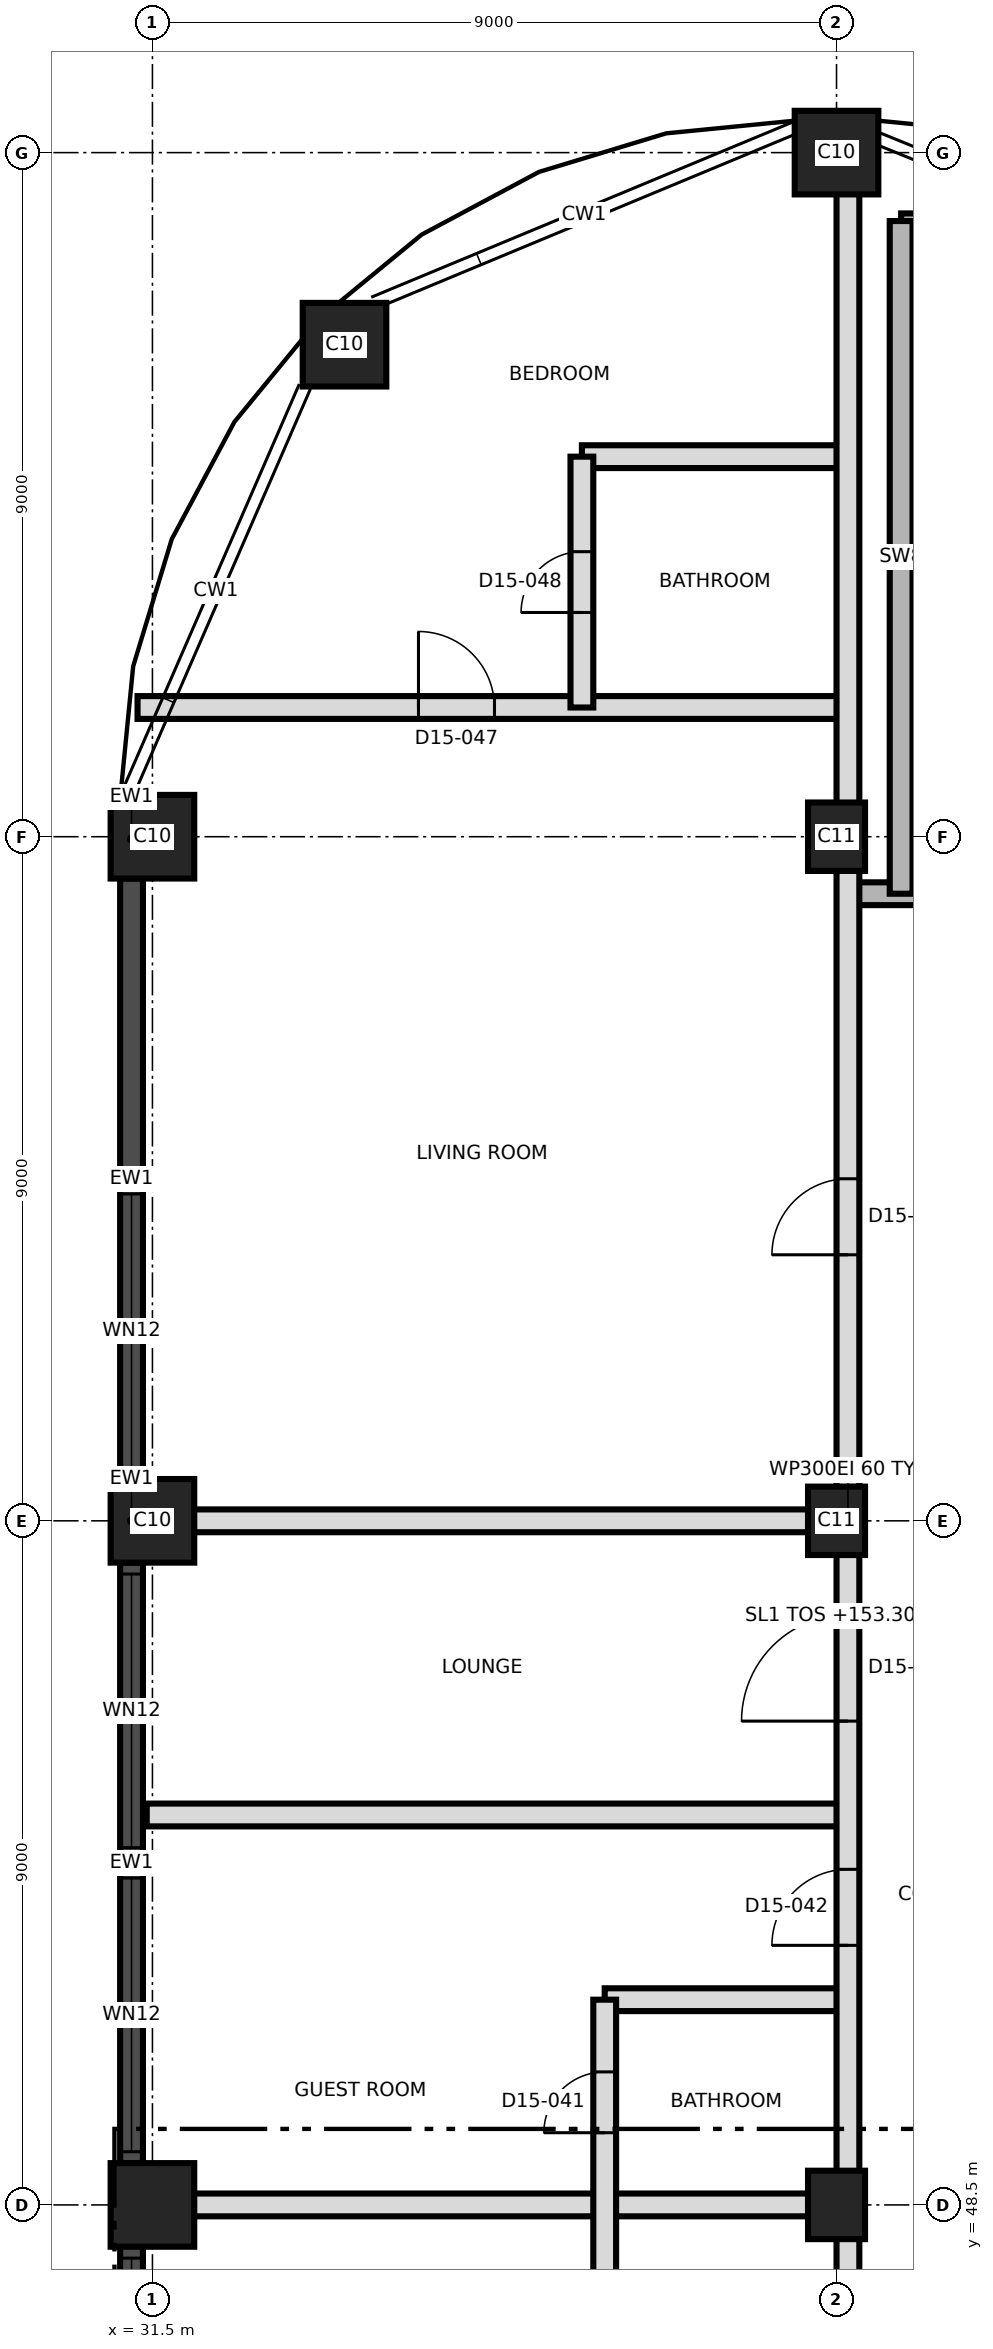
"""IFC4 building model, lengths in metres.
Left out: names, types, materials, properties, quantities, classifications, styles, units other than length and angle.
Written with IfcOpenShell. Run it as: python <this file> out.ifc"""

import sys

from ifc_helpers import new_model, si_unit, direction, frame, frame_2d, origin, origin_2d, place, context, subcontext, project, spatial, rectangle, extrude, element, fill, save


model = new_model("IFC4")
c1 = context("Model", 3, precision=1e-05, world=origin(), true_north=direction((0.0, 1.0)))
c2 = subcontext(c1, "Body", "Model", "MODEL_VIEW")
j1 = project(units=[si_unit("LENGTHUNIT", "METRE"), si_unit("PLANEANGLEUNIT", "RADIAN")], contexts=[c1])
p1 = place(None, origin())
s1 = spatial("IfcSite", under=j1, at=p1, CompositionType="ELEMENT")
p2 = place(p1, origin())
s2 = spatial("IfcBuilding", under=s1, at=p2, CompositionType="ELEMENT")
p3 = place(p2, frame((0.0, 0.0, 153.3)))
s3 = spatial("IfcBuildingStorey", under=s2, at=p3, CompositionType="ELEMENT", Elevation=153.3)
p4 = place(p3, frame((31.5, 48.5, 0.0), z_axis=(0.0, 0.0, 1.0), x_axis=(1.0, 0.0, 0.0)))
e1 = element("IfcColumn", 1, at=p4, inside=s3, PredefinedType="COLUMN", context=c2, shape_type="SweptSolid", body=[
    extrude(rectangle(XDim=1.1, YDim=1.1, at=origin_2d()), origin(), (0.0, 0.0, 1.0), 3.7),
])
p5 = place(p3, frame((40.5, 48.5, 0.0), z_axis=(0.0, 0.0, 1.0), x_axis=(0.0, 1.0, 0.0)))
e2 = element("IfcColumn", 2, at=p5, inside=s3, PredefinedType="COLUMN", context=c2, shape_type="SweptSolid", body=[
    extrude(rectangle(XDim=0.9, YDim=0.75, at=origin_2d()), origin(), (0.0, 0.0, 1.0), 3.7),
])
p6 = place(p3, frame((31.5, 57.5, 0.0), z_axis=(0.0, 0.0, 1.0), x_axis=(1.0, 0.0, 0.0)))
e3 = element("IfcColumn", 3, at=p6, inside=s3, PredefinedType="COLUMN", context=c2, shape_type="SweptSolid", body=[
    extrude(rectangle(XDim=1.1, YDim=1.1, at=origin_2d()), origin(), (0.0, 0.0, 1.0), 3.7),
])
p7 = place(p3, frame((40.5, 57.5, 0.0), z_axis=(0.0, 0.0, 1.0), x_axis=(0.0, 1.0, 0.0)))
e4 = element("IfcColumn", 4, at=p7, inside=s3, PredefinedType="COLUMN", context=c2, shape_type="SweptSolid", body=[
    extrude(rectangle(XDim=0.9, YDim=0.75, at=origin_2d()), origin(), (0.0, 0.0, 1.0), 3.7),
])
p8 = place(p3, frame((31.5, 66.5, 0.0), z_axis=(0.0, 0.0, 1.0), x_axis=(1.0, 0.0, 0.0)))
e5 = element("IfcColumn", 5, at=p8, inside=s3, PredefinedType="COLUMN", context=c2, shape_type="SweptSolid", body=[
    extrude(rectangle(XDim=1.1, YDim=1.1, at=origin_2d()), origin(), (0.0, 0.0, 1.0), 3.7),
])
p9 = place(p3, frame((40.5, 66.5, 0.0), z_axis=(0.0, 0.0, 1.0), x_axis=(0.0, 1.0, 0.0)))
e6 = element("IfcColumn", 6, at=p9, inside=s3, PredefinedType="COLUMN", context=c2, shape_type="SweptSolid", body=[
    extrude(rectangle(XDim=0.9, YDim=0.75, at=origin_2d()), origin(), (0.0, 0.0, 1.0), 3.7),
])
for number, where, z_axis, x_axis in (
    (7, (34.027, 72.973, 0.0), (0.0, 0.0, 1.0), (1.0, 0.0, 0.0)),
    (8, (40.5, 75.5, 0.0), (0.0, 0.0, 1.0), (1.0, 0.0, 0.0)),
):
    element("IfcColumn", number, at=place(p3, frame(where, z_axis=z_axis, x_axis=x_axis)), inside=s3, PredefinedType="COLUMN", context=c2, shape_type="SweptSolid", body=[
        extrude(rectangle(XDim=1.1, YDim=1.1, at=origin_2d()), origin(), (0.0, 0.0, 1.0), 3.7),
    ])
p10 = place(p3, frame((31.225, 66.992, 0.0), z_axis=(0.0, 0.0, 1.0), x_axis=(0.0, -1.0, 0.0)))
e9 = element("IfcWall", 9, at=p10, inside=s3, PredefinedType="SOLIDWALL", context=c2, shape_type="SweptSolid", body=[
    extrude(rectangle(XDim=1.042, YDim=0.3, at=frame_2d((0.521, 0.0))), origin(), (0.0, 0.0, 1.0), 3.4),
])
p11 = place(p3, frame((31.225, 65.95, 0.0), z_axis=(0.0, 0.0, 1.0), x_axis=(0.0, -1.0, 0.0)))
e10 = element("IfcWall", 10, at=p11, inside=s3, PredefinedType="SOLIDWALL", context=c2, shape_type="SweptSolid", body=[
    extrude(rectangle(XDim=7.9, YDim=0.3, at=frame_2d((3.95, 0.0))), origin(), (0.0, 0.0, 1.0), 2.8),
])
p12 = place(p11, frame((4.15, 0.0, 0.9)))
e11 = element("IfcOpeningElement", 11, at=p12, cuts=e10, PredefinedType="OPENING", context=c2, shape_type="SweptSolid", body=[
    extrude(rectangle(XDim=3.6, YDim=1.5, at=frame_2d((1.8, 0.75))), frame((0.0, 0.16, 0.0), z_axis=(0.0, -1.0, 0.0), x_axis=(1.0, 0.0, 0.0)), (0.0, 0.0, 1.0), 0.32),
])
p13 = place(p3, frame((31.225, 58.05, 0.0), z_axis=(0.0, 0.0, 1.0), x_axis=(0.0, -1.0, 0.0)))
e12 = element("IfcWall", 12, at=p13, inside=s3, PredefinedType="SOLIDWALL", context=c2, shape_type="SweptSolid", body=[
    extrude(rectangle(XDim=1.1, YDim=0.3, at=frame_2d((0.55, 0.0))), origin(), (0.0, 0.0, 1.0), 3.4),
])
p14 = place(p3, frame((31.225, 56.95, 0.0), z_axis=(0.0, 0.0, 1.0), x_axis=(0.0, -1.0, 0.0)))
e13 = element("IfcWall", 13, at=p14, inside=s3, PredefinedType="SOLIDWALL", context=c2, shape_type="SweptSolid", body=[
    extrude(rectangle(XDim=7.9, YDim=0.3, at=frame_2d((3.95, 0.0))), origin(), (0.0, 0.0, 1.0), 2.8),
])
p15 = place(p14, frame((0.15, 0.0, 0.9)))
e14 = element("IfcOpeningElement", 14, at=p15, cuts=e13, PredefinedType="OPENING", context=c2, shape_type="SweptSolid", body=[
    extrude(rectangle(XDim=3.6, YDim=1.5, at=frame_2d((1.8, 0.75))), frame((0.0, 0.16, 0.0), z_axis=(0.0, -1.0, 0.0), x_axis=(1.0, 0.0, 0.0)), (0.0, 0.0, 1.0), 0.32),
])
p16 = place(p14, frame((4.15, 0.0, 0.9)))
e15 = element("IfcOpeningElement", 15, at=p16, cuts=e13, PredefinedType="OPENING", context=c2, shape_type="SweptSolid", body=[
    extrude(rectangle(XDim=3.6, YDim=1.5, at=frame_2d((1.8, 0.75))), frame((0.0, 0.16, 0.0), z_axis=(0.0, -1.0, 0.0), x_axis=(1.0, 0.0, 0.0)), (0.0, 0.0, 1.0), 0.32),
])
p17 = place(p3, frame((31.225, 49.05, 0.0), z_axis=(0.0, 0.0, 1.0), x_axis=(0.0, -1.0, 0.0)))
e16 = element("IfcWall", 16, at=p17, inside=s3, PredefinedType="SOLIDWALL", context=c2, shape_type="SweptSolid", body=[
    extrude(rectangle(XDim=8.87, YDim=0.3, at=frame_2d((4.435, 0.0))), origin(), (0.0, 0.0, 1.0), 3.4),
])
p18 = place(p17, frame((1.25, 0.0, 0.9)))
e17 = element("IfcOpeningElement", 17, at=p18, cuts=e16, PredefinedType="OPENING", context=c2, shape_type="SweptSolid", body=[
    extrude(rectangle(XDim=3.6, YDim=1.5, at=frame_2d((1.8, 0.75))), frame((0.0, 0.16, 0.0), z_axis=(0.0, -1.0, 0.0), x_axis=(1.0, 0.0, 0.0)), (0.0, 0.0, 1.0), 0.32),
])
p19 = place(p17, frame((6.06, 0.0, 0.3)))
e18 = element("IfcOpeningElement", 18, at=p19, cuts=e16, PredefinedType="OPENING", context=c2, shape_type="SweptSolid", body=[
    extrude(rectangle(XDim=1.8, YDim=2.4, at=frame_2d((0.9, 1.2))), frame((0.0, 0.16, 0.0), z_axis=(0.0, -1.0, 0.0), x_axis=(1.0, 0.0, 0.0)), (0.0, 0.0, 1.0), 0.32),
])
p20 = place(p3, frame((31.425, 48.5, 0.0), z_axis=(0.0, 0.0, 1.0), x_axis=(1.0, 0.0, 0.0)))
e19 = element("IfcWall", 19, at=p20, inside=s3, PredefinedType="PARTITIONING", context=c2, shape_type="SweptSolid", body=[
    extrude(rectangle(XDim=9.225, YDim=0.3, at=frame_2d((4.612, 0.0))), origin(), (0.0, 0.0, 1.0), 3.4),
])
p21 = place(p3, frame((37.45, 51.2, 0.0), z_axis=(0.0, 0.0, 1.0), x_axis=(1.0, 0.0, 0.0)))
e20 = element("IfcWall", 20, at=p21, inside=s3, PredefinedType="PARTITIONING", context=c2, shape_type="SweptSolid", body=[
    extrude(rectangle(XDim=3.2, YDim=0.3, at=frame_2d((1.6, 0.0))), origin(), (0.0, 0.0, 1.0), 3.4),
])
for number, where, z_axis, x_axis in (
    (21, (31.425, 53.63, 0.0), (0.0, 0.0, 1.0), (1.0, 0.0, 0.0)),
    (22, (31.425, 57.5, 0.0), (0.0, 0.0, 1.0), (1.0, 0.0, 0.0)),
):
    element("IfcWall", number, at=place(p3, frame(where, z_axis=z_axis, x_axis=x_axis)), inside=s3, PredefinedType="PARTITIONING", context=c2, shape_type="SweptSolid", body=[
        extrude(rectangle(XDim=9.225, YDim=0.3, at=frame_2d((4.612, 0.0))), origin(), (0.0, 0.0, 1.0), 3.4),
    ])
p22 = place(p3, frame((40.65, 65.75, 0.0), z_axis=(0.0, 0.0, 1.0), x_axis=(1.0, 0.0, 0.0)))
e23 = element("IfcWall", 23, at=p22, inside=s3, PredefinedType="SHEAR", context=c2, shape_type="SweptSolid", body=[
    extrude(rectangle(XDim=3.7, YDim=0.3, at=frame_2d((1.85, 0.0))), origin(), (0.0, 0.0, 1.0), 3.4),
])
p23 = place(p22, frame((1.1, 0.0, 0.0)))
e24 = element("IfcOpeningElement", 24, at=p23, cuts=e23, PredefinedType="OPENING", context=c2, shape_type="SweptSolid", body=[
    extrude(rectangle(XDim=1.2, YDim=2.1, at=frame_2d((0.6, 1.05))), frame((0.0, 0.16, 0.0), z_axis=(0.0, -1.0, 0.0), x_axis=(1.0, 0.0, 0.0)), (0.0, 0.0, 1.0), 0.32),
])
p24 = place(p3, frame((31.304, 68.2, 0.0), z_axis=(0.0, 0.0, 1.0), x_axis=(1.0, 0.0, 0.0)))
e25 = element("IfcWall", 25, at=p24, inside=s3, PredefinedType="PARTITIONING", context=c2, shape_type="SweptSolid", body=[
    extrude(rectangle(XDim=9.346, YDim=0.3, at=frame_2d((4.673, 0.0))), origin(), (0.0, 0.0, 1.0), 3.4),
])
p25 = place(p24, frame((3.696, 0.0, 0.0)))
e26 = element("IfcOpeningElement", 26, at=p25, cuts=e25, PredefinedType="OPENING", context=c2, shape_type="SweptSolid", body=[
    extrude(rectangle(XDim=1.0, YDim=2.1, at=frame_2d((0.5, 1.05))), frame((0.0, 0.16, 0.0), z_axis=(0.0, -1.0, 0.0), x_axis=(1.0, 0.0, 0.0)), (0.0, 0.0, 1.0), 0.32),
])
p26 = place(p3, frame((37.15, 71.5, 0.0), z_axis=(0.0, 0.0, 1.0), x_axis=(1.0, 0.0, 0.0)))
e27 = element("IfcWall", 27, at=p26, inside=s3, PredefinedType="PARTITIONING", context=c2, shape_type="SweptSolid", body=[
    extrude(rectangle(XDim=3.5, YDim=0.3, at=frame_2d((1.75, 0.0))), origin(), (0.0, 0.0, 1.0), 3.4),
])
p27 = place(p3, frame((41.35, 74.55, 0.0), z_axis=(0.0, 0.0, 1.0), x_axis=(1.0, 0.0, 0.0)))
e28 = element("IfcWall", 28, at=p27, inside=s3, PredefinedType="SHEAR", context=c2, shape_type="SweptSolid", body=[
    extrude(rectangle(XDim=3.0, YDim=0.3, at=frame_2d((1.5, 0.0))), origin(), (0.0, 0.0, 1.0), 3.4),
])
p28 = place(p3, frame((37.15, 68.2, 0.0), z_axis=(0.0, 0.0, 1.0), x_axis=(0.0, 1.0, 0.0)))
e29 = element("IfcWall", 29, at=p28, inside=s3, PredefinedType="PARTITIONING", context=c2, shape_type="SweptSolid", body=[
    extrude(rectangle(XDim=3.3, YDim=0.3, at=frame_2d((1.65, 0.0))), origin(), (0.0, 0.0, 1.0), 3.4),
])
p29 = place(p28, frame((1.25, 0.0, 0.0)))
e30 = element("IfcOpeningElement", 30, at=p29, cuts=e29, PredefinedType="OPENING", context=c2, shape_type="SweptSolid", body=[
    extrude(rectangle(XDim=0.8, YDim=2.1, at=frame_2d((0.4, 1.05))), frame((0.0, 0.16, 0.0), z_axis=(0.0, -1.0, 0.0), x_axis=(1.0, 0.0, 0.0)), (0.0, 0.0, 1.0), 0.32),
])
p30 = place(p3, frame((37.45, 45.8, 0.0), z_axis=(0.0, 0.0, 1.0), x_axis=(0.0, 1.0, 0.0)))
e31 = element("IfcWall", 31, at=p30, inside=s3, PredefinedType="PARTITIONING", context=c2, shape_type="SweptSolid", body=[
    extrude(rectangle(XDim=5.4, YDim=0.3, at=frame_2d((2.7, 0.0))), origin(), (0.0, 0.0, 1.0), 3.4),
])
p31 = place(p30, frame((0.95, 0.0, 0.0)))
e32 = element("IfcOpeningElement", 32, at=p31, cuts=e31, PredefinedType="OPENING", context=c2, shape_type="SweptSolid", body=[
    extrude(rectangle(XDim=0.8, YDim=2.1, at=frame_2d((0.4, 1.05))), frame((0.0, 0.16, 0.0), z_axis=(0.0, -1.0, 0.0), x_axis=(1.0, 0.0, 0.0)), (0.0, 0.0, 1.0), 0.32),
])
p32 = place(p30, frame((3.65, 0.0, 0.0)))
e33 = element("IfcOpeningElement", 33, at=p32, cuts=e31, PredefinedType="OPENING", context=c2, shape_type="SweptSolid", body=[
    extrude(rectangle(XDim=0.8, YDim=2.1, at=frame_2d((0.4, 1.05))), frame((0.0, 0.16, 0.0), z_axis=(0.0, -1.0, 0.0), x_axis=(1.0, 0.0, 0.0)), (0.0, 0.0, 1.0), 0.32),
])
p33 = place(p3, frame((40.65, 39.65, 0.0), z_axis=(0.0, 0.0, 1.0), x_axis=(0.0, 1.0, 0.0)))
e34 = element("IfcWall", 34, at=p33, inside=s3, PredefinedType="PARTITIONING", context=c2, shape_type="SweptSolid", body=[
    extrude(rectangle(XDim=35.925, YDim=0.3, at=frame_2d((17.962, 0.0))), origin(), (0.0, 0.0, 1.0), 3.4),
])
p34 = place(p33, frame((1.55, 0.0, 0.0)))
e35 = element("IfcOpeningElement", 35, at=p34, cuts=e34, PredefinedType="OPENING", context=c2, shape_type="SweptSolid", body=[
    extrude(rectangle(XDim=1.2, YDim=2.1, at=frame_2d((0.6, 1.05))), frame((0.0, 0.16, 0.0), z_axis=(0.0, -1.0, 0.0), x_axis=(1.0, 0.0, 0.0)), (0.0, 0.0, 1.0), 0.32),
])
p35 = place(p33, frame((4.8, 0.0, 0.0)))
e36 = element("IfcOpeningElement", 36, at=p35, cuts=e34, PredefinedType="OPENING", context=c2, shape_type="SweptSolid", body=[
    extrude(rectangle(XDim=1.0, YDim=2.1, at=frame_2d((0.5, 1.05))), frame((0.0, 0.16, 0.0), z_axis=(0.0, -1.0, 0.0), x_axis=(1.0, 0.0, 0.0)), (0.0, 0.0, 1.0), 0.32),
])
p36 = place(p33, frame((12.265, 0.0, 0.0)))
e37 = element("IfcOpeningElement", 37, at=p36, cuts=e34, PredefinedType="OPENING", context=c2, shape_type="SweptSolid", body=[
    extrude(rectangle(XDim=1.0, YDim=2.1, at=frame_2d((0.5, 1.05))), frame((0.0, 0.16, 0.0), z_axis=(0.0, -1.0, 0.0), x_axis=(1.0, 0.0, 0.0)), (0.0, 0.0, 1.0), 0.32),
])
p37 = place(p33, frame((15.215, 0.0, 0.0)))
e38 = element("IfcOpeningElement", 38, at=p37, cuts=e34, PredefinedType="OPENING", context=c2, shape_type="SweptSolid", body=[
    extrude(rectangle(XDim=1.4, YDim=2.1, at=frame_2d((0.7, 1.05))), frame((0.0, 0.16, 0.0), z_axis=(0.0, -1.0, 0.0), x_axis=(1.0, 0.0, 0.0)), (0.0, 0.0, 1.0), 0.32),
])
p38 = place(p33, frame((21.35, 0.0, 0.0)))
e39 = element("IfcOpeningElement", 39, at=p38, cuts=e34, PredefinedType="OPENING", context=c2, shape_type="SweptSolid", body=[
    extrude(rectangle(XDim=1.0, YDim=2.4, at=frame_2d((0.5, 1.2))), frame((0.0, 0.16, 0.0), z_axis=(0.0, -1.0, 0.0), x_axis=(1.0, 0.0, 0.0)), (0.0, 0.0, 1.0), 0.32),
])
p39 = place(p3, frame((41.35, 65.75, 0.0), z_axis=(0.0, 0.0, 1.0), x_axis=(0.0, 1.0, 0.0)))
e40 = element("IfcWall", 40, at=p39, inside=s3, PredefinedType="SHEAR", context=c2, shape_type="SweptSolid", body=[
    extrude(rectangle(XDim=8.85, YDim=0.3, at=frame_2d((4.425, 0.0))), origin(), (0.0, 0.0, 1.0), 3.4),
])
p40 = place(p12, origin())
e41 = element("IfcWindow", 41, at=p40, inside=s3, PartitioningType="SINGLE_PANEL", PredefinedType="WINDOW", context=c2, shape_type="SweptSolid", body=[
    extrude(rectangle(XDim=3.6, YDim=1.5, at=frame_2d((1.8, 0.75))), frame((0.0, 0.03, 0.0), z_axis=(0.0, -1.0, 0.0), x_axis=(1.0, 0.0, 0.0)), (0.0, 0.0, 1.0), 0.06),
])
fill(e11, e41)
p41 = place(p15, origin())
e42 = element("IfcWindow", 42, at=p41, inside=s3, PartitioningType="SINGLE_PANEL", PredefinedType="WINDOW", context=c2, shape_type="SweptSolid", body=[
    extrude(rectangle(XDim=3.6, YDim=1.5, at=frame_2d((1.8, 0.75))), frame((0.0, 0.03, 0.0), z_axis=(0.0, -1.0, 0.0), x_axis=(1.0, 0.0, 0.0)), (0.0, 0.0, 1.0), 0.06),
])
fill(e14, e42)
p42 = place(p16, origin())
e43 = element("IfcWindow", 43, at=p42, inside=s3, PartitioningType="SINGLE_PANEL", PredefinedType="WINDOW", context=c2, shape_type="SweptSolid", body=[
    extrude(rectangle(XDim=3.6, YDim=1.5, at=frame_2d((1.8, 0.75))), frame((0.0, 0.03, 0.0), z_axis=(0.0, -1.0, 0.0), x_axis=(1.0, 0.0, 0.0)), (0.0, 0.0, 1.0), 0.06),
])
fill(e15, e43)
p43 = place(p18, origin())
e44 = element("IfcWindow", 44, at=p43, inside=s3, PartitioningType="SINGLE_PANEL", PredefinedType="WINDOW", context=c2, shape_type="SweptSolid", body=[
    extrude(rectangle(XDim=3.6, YDim=1.5, at=frame_2d((1.8, 0.75))), frame((0.0, 0.03, 0.0), z_axis=(0.0, -1.0, 0.0), x_axis=(1.0, 0.0, 0.0)), (0.0, 0.0, 1.0), 0.06),
])
fill(e17, e44)
p44 = place(p32, origin())
e45 = element("IfcDoor", 45, at=p44, inside=s3, OperationType="SINGLE_SWING_LEFT", PredefinedType="DOOR", context=c2, shape_type="SweptSolid", body=[
    extrude(rectangle(XDim=0.8, YDim=2.1, at=frame_2d((0.4, 1.05))), frame((0.0, 0.025, 0.0), z_axis=(0.0, -1.0, 0.0), x_axis=(1.0, 0.0, 0.0)), (0.0, 0.0, 1.0), 0.05),
])
fill(e33, e45)
p45 = place(p36, origin())
e46 = element("IfcDoor", 46, at=p45, inside=s3, OperationType="SINGLE_SWING_LEFT", PredefinedType="DOOR", context=c2, shape_type="SweptSolid", body=[
    extrude(rectangle(XDim=1.0, YDim=2.1, at=frame_2d((0.5, 1.05))), frame((0.0, 0.025, 0.0), z_axis=(0.0, -1.0, 0.0), x_axis=(1.0, 0.0, 0.0)), (0.0, 0.0, 1.0), 0.05),
])
fill(e37, e46)
p46 = place(p37, origin())
e47 = element("IfcDoor", 47, at=p46, inside=s3, OperationType="SINGLE_SWING_RIGHT", PredefinedType="DOOR", context=c2, shape_type="SweptSolid", body=[
    extrude(rectangle(XDim=1.4, YDim=2.1, at=frame_2d((0.7, 1.05))), frame((0.0, 0.025, 0.0), z_axis=(0.0, -1.0, 0.0), x_axis=(1.0, 0.0, 0.0)), (0.0, 0.0, 1.0), 0.05),
])
fill(e38, e47)
p47 = place(p38, origin())
e48 = element("IfcDoor", 48, at=p47, inside=s3, OperationType="SINGLE_SWING_RIGHT", PredefinedType="DOOR", context=c2, shape_type="SweptSolid", body=[
    extrude(rectangle(XDim=1.0, YDim=2.4, at=frame_2d((0.5, 1.2))), frame((0.0, 0.025, 0.0), z_axis=(0.0, -1.0, 0.0), x_axis=(1.0, 0.0, 0.0)), (0.0, 0.0, 1.0), 0.05),
])
fill(e39, e48)
p48 = place(p25, origin())
e49 = element("IfcDoor", 49, at=p48, inside=s3, OperationType="SINGLE_SWING_LEFT", PredefinedType="DOOR", context=c2, shape_type="SweptSolid", body=[
    extrude(rectangle(XDim=1.0, YDim=2.1, at=frame_2d((0.5, 1.05))), frame((0.0, 0.025, 0.0), z_axis=(0.0, -1.0, 0.0), x_axis=(1.0, 0.0, 0.0)), (0.0, 0.0, 1.0), 0.05),
])
fill(e26, e49)
p49 = place(p29, origin())
e50 = element("IfcDoor", 50, at=p49, inside=s3, OperationType="SINGLE_SWING_LEFT", PredefinedType="DOOR", context=c2, shape_type="SweptSolid", body=[
    extrude(rectangle(XDim=0.8, YDim=2.1, at=frame_2d((0.4, 1.05))), frame((0.0, 0.025, 0.0), z_axis=(0.0, -1.0, 0.0), x_axis=(1.0, 0.0, 0.0)), (0.0, 0.0, 1.0), 0.05),
])
fill(e30, e50)
save(model, sys.argv[1])
